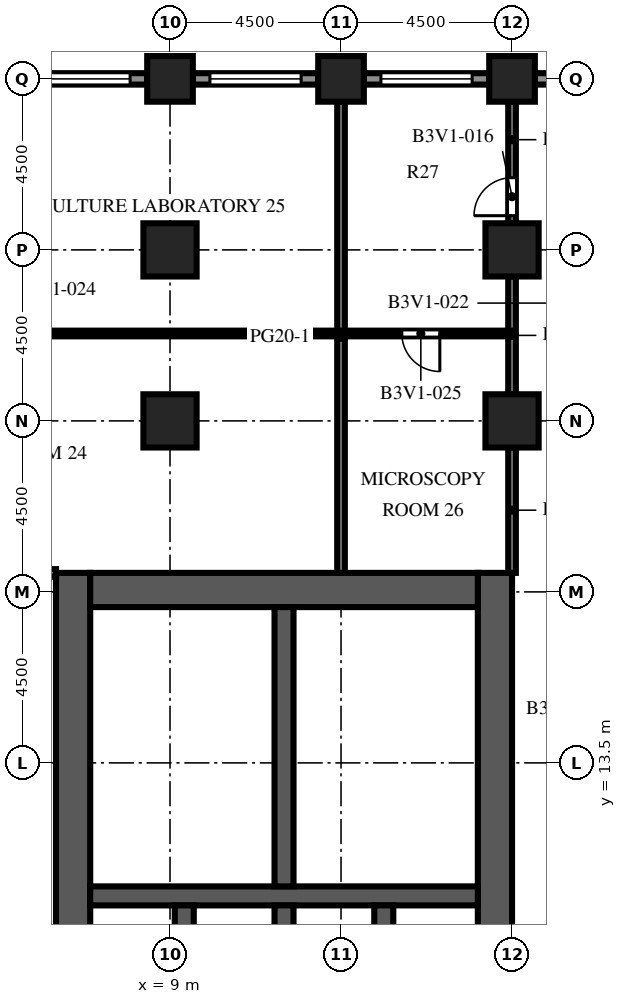
"""IFC4 building model, lengths in metres.
Left out: names, types, materials, properties, quantities, classifications, styles, units other than length and angle.
Written with IfcOpenShell. Run it as: python <this file> out.ifc"""

import sys

from ifc_helpers import new_model, si_unit, direction, frame, frame_2d, origin, origin_2d, place, context, subcontext, project, spatial, rectangle, extrude, element, fill, save


model = new_model("IFC4")
c1 = context("Model", 3, precision=1e-05, world=origin(), true_north=direction((0.0, 1.0)))
c2 = subcontext(c1, "Body", "Model", "MODEL_VIEW")
j1 = project(units=[si_unit("LENGTHUNIT", "METRE"), si_unit("PLANEANGLEUNIT", "RADIAN")], contexts=[c1])
p1 = place(None, origin())
s1 = spatial("IfcSite", under=j1, at=p1, CompositionType="ELEMENT")
p2 = place(p1, origin())
s2 = spatial("IfcBuilding", under=s1, at=p2, CompositionType="ELEMENT")
p3 = place(p2, frame((0.0, 0.0, 94.3)))
s3 = spatial("IfcBuildingStorey", under=s2, at=p3, CompositionType="ELEMENT", Elevation=94.3)
for number, where, z_axis, x_axis in (
    (1, (9.0, 31.5, 0.0), (0.0, 0.0, 1.0), (1.0, 0.0, 0.0)),
    (2, (13.5, 31.5, 0.0), (0.0, 0.0, 1.0), (1.0, 0.0, 0.0)),
    (3, (18.0, 31.5, 0.0), (0.0, 0.0, 1.0), (1.0, 0.0, 0.0)),
):
    element("IfcColumn", number, at=place(p3, frame(where, z_axis=z_axis, x_axis=x_axis)), inside=s3, PredefinedType="COLUMN", context=c2, shape_type="SweptSolid", body=[
        extrude(rectangle(XDim=1.2, YDim=1.2, at=origin_2d()), origin(), (0.0, 0.0, 1.0), 4.1),
    ])
for number, where, z_axis, x_axis in (
    (4, (9.0, 22.5, 0.0), (0.0, 0.0, 1.0), (1.0, 0.0, 0.0)),
    (5, (9.0, 27.0, 0.0), (0.0, 0.0, 1.0), (1.0, 0.0, 0.0)),
    (6, (18.0, 22.5, 0.0), (0.0, 0.0, 1.0), (1.0, 0.0, 0.0)),
    (7, (18.0, 27.0, 0.0), (0.0, 0.0, 1.0), (1.0, 0.0, 0.0)),
):
    element("IfcColumn", number, at=place(p3, frame(where, z_axis=z_axis, x_axis=x_axis)), inside=s3, PredefinedType="COLUMN", context=c2, shape_type="SweptSolid", body=[
        extrude(rectangle(XDim=1.4, YDim=1.4, at=origin_2d()), origin(), (0.0, 0.0, 1.0), 4.1),
    ])
p4 = place(p3, frame((6.45, -9.0, 0.0), z_axis=(0.0, 0.0, 1.0), x_axis=(0.0, 1.0, 0.0)))
e8 = element("IfcWall", 8, at=p4, inside=s3, PredefinedType="SHEAR", context=c2, shape_type="SweptSolid", body=[
    extrude(rectangle(XDim=27.5, YDim=0.9, at=frame_2d((13.75, 0.0))), origin(), (0.0, 0.0, 1.0), 4.1),
])
p5 = place(p4, frame((12.55, 0.0, 0.0)))
e9 = element("IfcOpeningElement", 9, at=p5, cuts=e8, PredefinedType="OPENING", context=c2, shape_type="SweptSolid", body=[
    extrude(rectangle(XDim=2.4, YDim=2.4, at=frame_2d((1.2, 1.2))), frame((0.0, 0.46, 0.0), z_axis=(0.0, -1.0, 0.0), x_axis=(1.0, 0.0, 0.0)), (0.0, 0.0, 1.0), 0.92),
])
p6 = place(p4, frame((3.975, 0.0, 0.0)))
e10 = element("IfcOpeningElement", 10, at=p6, cuts=e8, PredefinedType="OPENING", context=c2, shape_type="SweptSolid", body=[
    extrude(rectangle(XDim=1.2, YDim=2.1, at=frame_2d((0.6, 1.05))), frame((0.0, 0.46, 0.0), z_axis=(0.0, -1.0, 0.0), x_axis=(1.0, 0.0, 0.0)), (0.0, 0.0, 1.0), 0.92),
])
p7 = place(p4, frame((22.325, 0.0, 0.0)))
e11 = element("IfcOpeningElement", 11, at=p7, cuts=e8, PredefinedType="OPENING", context=c2, shape_type="SweptSolid", body=[
    extrude(rectangle(XDim=1.2, YDim=2.1, at=frame_2d((0.6, 1.05))), frame((0.0, 0.46, 0.0), z_axis=(0.0, -1.0, 0.0), x_axis=(1.0, 0.0, 0.0)), (0.0, 0.0, 1.0), 0.92),
])
p8 = place(p3, frame((17.55, -9.0, 0.0), z_axis=(0.0, 0.0, 1.0), x_axis=(0.0, 1.0, 0.0)))
e12 = element("IfcWall", 12, at=p8, inside=s3, PredefinedType="SHEAR", context=c2, shape_type="SweptSolid", body=[
    extrude(rectangle(XDim=27.5, YDim=0.9, at=frame_2d((13.75, 0.0))), origin(), (0.0, 0.0, 1.0), 4.1),
])
p9 = place(p8, frame((12.55, 0.0, 0.0)))
e13 = element("IfcOpeningElement", 13, at=p9, cuts=e12, PredefinedType="OPENING", context=c2, shape_type="SweptSolid", body=[
    extrude(rectangle(XDim=2.4, YDim=2.4, at=frame_2d((1.2, 1.2))), frame((0.0, 0.46, 0.0), z_axis=(0.0, -1.0, 0.0), x_axis=(1.0, 0.0, 0.0)), (0.0, 0.0, 1.0), 0.92),
])
p10 = place(p8, frame((6.825, 0.0, 0.0)))
e14 = element("IfcOpeningElement", 14, at=p10, cuts=e12, PredefinedType="OPENING", context=c2, shape_type="SweptSolid", body=[
    extrude(rectangle(XDim=1.2, YDim=2.1, at=frame_2d((0.6, 1.05))), frame((0.0, 0.46, 0.0), z_axis=(0.0, -1.0, 0.0), x_axis=(1.0, 0.0, 0.0)), (0.0, 0.0, 1.0), 0.92),
])
p11 = place(p8, frame((19.475, 0.0, 0.0)))
e15 = element("IfcOpeningElement", 15, at=p11, cuts=e12, PredefinedType="OPENING", context=c2, shape_type="SweptSolid", body=[
    extrude(rectangle(XDim=1.2, YDim=2.1, at=frame_2d((0.6, 1.05))), frame((0.0, 0.46, 0.0), z_axis=(0.0, -1.0, 0.0), x_axis=(1.0, 0.0, 0.0)), (0.0, 0.0, 1.0), 0.92),
])
p12 = place(p3, frame((6.9, 18.05, 0.0), z_axis=(0.0, 0.0, 1.0), x_axis=(1.0, 0.0, 0.0)))
e16 = element("IfcWall", 16, at=p12, inside=s3, PredefinedType="SHEAR", context=c2, shape_type="SweptSolid", body=[
    extrude(rectangle(XDim=10.2, YDim=0.9, at=frame_2d((5.1, 0.0))), origin(), (0.0, 0.0, 1.0), 4.1),
])
p13 = place(p3, frame((6.9, 10.0, 0.0), z_axis=(0.0, 0.0, 1.0), x_axis=(1.0, 0.0, 0.0)))
e17 = element("IfcWall", 17, at=p13, inside=s3, PredefinedType="SHEAR", context=c2, shape_type="SweptSolid", body=[
    extrude(rectangle(XDim=10.2, YDim=0.5, at=frame_2d((5.1, 0.0))), origin(), (0.0, 0.0, 1.0), 4.1),
])
for number, where, z_axis, x_axis in (
    (18, (9.375, 6.95, 0.0), (0.0, 0.0, 1.0), (0.0, 1.0, 0.0)),
    (19, (12.0, 6.95, 0.0), (0.0, 0.0, 1.0), (0.0, 1.0, 0.0)),
    (20, (14.625, 6.95, 0.0), (0.0, 0.0, 1.0), (0.0, 1.0, 0.0)),
):
    element("IfcWall", number, at=place(p3, frame(where, z_axis=z_axis, x_axis=x_axis)), inside=s3, PredefinedType="SHEAR", context=c2, shape_type="SweptSolid", body=[
        extrude(rectangle(XDim=2.8, YDim=0.5, at=frame_2d((1.4, 0.0))), origin(), (0.0, 0.0, 1.0), 4.1),
    ])
p14 = place(p3, frame((12.0, 10.25, 0.0), z_axis=(0.0, 0.0, 1.0), x_axis=(0.0, 1.0, 0.0)))
e21 = element("IfcWall", 21, at=p14, inside=s3, PredefinedType="SHEAR", context=c2, shape_type="SweptSolid", body=[
    extrude(rectangle(XDim=7.35, YDim=0.5, at=frame_2d((3.675, 0.0))), origin(), (0.0, 0.0, 1.0), 4.1),
])
p15 = place(p3, frame((18.6, 31.5, 0.0), z_axis=(0.0, 0.0, 1.0), x_axis=(1.0, 0.0, 0.0)))
e22 = element("IfcWall", 22, at=p15, inside=s3, PredefinedType="SOLIDWALL", context=c2, shape_type="SweptSolid", body=[
    extrude(rectangle(XDim=3.3, YDim=0.3, at=frame_2d((1.65, 0.0))), origin(), (0.0, 0.0, 1.0), 2.75),
])
p16 = place(p15, frame((1.15, 0.0, 0.0)))
e23 = element("IfcOpeningElement", 23, at=p16, cuts=e22, PredefinedType="OPENING", context=c2, shape_type="SweptSolid", body=[
    extrude(rectangle(XDim=1.0, YDim=2.2, at=frame_2d((0.5, 1.1))), frame((0.0, 0.16, 0.0), z_axis=(0.0, -1.0, 0.0), x_axis=(1.0, 0.0, 0.0)), (0.0, 0.0, 1.0), 0.32),
])
p17 = place(p3, frame((14.1, 31.5, 0.0), z_axis=(0.0, 0.0, 1.0), x_axis=(1.0, 0.0, 0.0)))
e24 = element("IfcWall", 24, at=p17, inside=s3, PredefinedType="SOLIDWALL", context=c2, shape_type="SweptSolid", body=[
    extrude(rectangle(XDim=3.3, YDim=0.3, at=frame_2d((1.65, 0.0))), origin(), (0.0, 0.0, 1.0), 2.75),
])
p18 = place(p17, frame((0.45, 0.0, 0.8)))
e25 = element("IfcOpeningElement", 25, at=p18, cuts=e24, PredefinedType="OPENING", context=c2, shape_type="SweptSolid", body=[
    extrude(rectangle(XDim=2.4, YDim=1.7, at=frame_2d((1.2, 0.85))), frame((0.0, 0.16, 0.0), z_axis=(0.0, -1.0, 0.0), x_axis=(1.0, 0.0, 0.0)), (0.0, 0.0, 1.0), 0.32),
])
p19 = place(p3, frame((9.6, 31.5, 0.0), z_axis=(0.0, 0.0, 1.0), x_axis=(1.0, 0.0, 0.0)))
e26 = element("IfcWall", 26, at=p19, inside=s3, PredefinedType="SOLIDWALL", context=c2, shape_type="SweptSolid", body=[
    extrude(rectangle(XDim=3.3, YDim=0.3, at=frame_2d((1.65, 0.0))), origin(), (0.0, 0.0, 1.0), 2.75),
])
p20 = place(p19, frame((0.45, 0.0, 0.8)))
e27 = element("IfcOpeningElement", 27, at=p20, cuts=e26, PredefinedType="OPENING", context=c2, shape_type="SweptSolid", body=[
    extrude(rectangle(XDim=2.4, YDim=1.7, at=frame_2d((1.2, 0.85))), frame((0.0, 0.16, 0.0), z_axis=(0.0, -1.0, 0.0), x_axis=(1.0, 0.0, 0.0)), (0.0, 0.0, 1.0), 0.32),
])
p21 = place(p3, frame((5.1, 31.5, 0.0), z_axis=(0.0, 0.0, 1.0), x_axis=(1.0, 0.0, 0.0)))
e28 = element("IfcWall", 28, at=p21, inside=s3, PredefinedType="SOLIDWALL", context=c2, shape_type="SweptSolid", body=[
    extrude(rectangle(XDim=3.3, YDim=0.3, at=frame_2d((1.65, 0.0))), origin(), (0.0, 0.0, 1.0), 2.75),
])
p22 = place(p21, frame((0.45, 0.0, 0.8)))
e29 = element("IfcOpeningElement", 29, at=p22, cuts=e28, PredefinedType="OPENING", context=c2, shape_type="SweptSolid", body=[
    extrude(rectangle(XDim=2.4, YDim=1.7, at=frame_2d((1.2, 0.85))), frame((0.0, 0.16, 0.0), z_axis=(0.0, -1.0, 0.0), x_axis=(1.0, 0.0, 0.0)), (0.0, 0.0, 1.0), 0.32),
])
p23 = place(p3, frame((8.3, 10.25, 0.0), z_axis=(0.0, 0.0, 1.0), x_axis=(0.0, 1.0, 0.0)))
e30 = element("IfcWall", 30, at=p23, inside=s3, PredefinedType="PARTITIONING", context=c2, shape_type="SweptSolid", body=[
    extrude(rectangle(XDim=2.205, YDim=0.1, at=frame_2d((1.103, 0.0))), origin(), (0.0, 0.0, 1.0), 3.65),
])
p24 = place(p23, frame((0.603, 0.0, 0.0)))
e31 = element("IfcOpeningElement", 31, at=p24, cuts=e30, PredefinedType="OPENING", context=c2, shape_type="SweptSolid", body=[
    extrude(rectangle(XDim=1.0, YDim=2.1, at=frame_2d((0.5, 1.05))), frame((0.0, 0.06, 0.0), z_axis=(0.0, -1.0, 0.0), x_axis=(1.0, 0.0, 0.0)), (0.0, 0.0, 1.0), 0.12),
])
p25 = place(p3, frame((8.3, 12.455, 0.0), z_axis=(0.0, 0.0, 1.0), x_axis=(0.0, 1.0, 0.0)))
e32 = element("IfcWall", 32, at=p25, inside=s3, PredefinedType="PARTITIONING", context=c2, shape_type="SweptSolid", body=[
    extrude(rectangle(XDim=2.352, YDim=0.1, at=frame_2d((1.176, 0.0))), origin(), (0.0, 0.0, 1.0), 3.65),
])
p26 = place(p25, frame((0.676, 0.0, 0.0)))
e33 = element("IfcOpeningElement", 33, at=p26, cuts=e32, PredefinedType="OPENING", context=c2, shape_type="SweptSolid", body=[
    extrude(rectangle(XDim=1.0, YDim=2.1, at=frame_2d((0.5, 1.05))), frame((0.0, 0.06, 0.0), z_axis=(0.0, -1.0, 0.0), x_axis=(1.0, 0.0, 0.0)), (0.0, 0.0, 1.0), 0.12),
])
p27 = place(p3, frame((8.3, 14.807, 0.0), z_axis=(0.0, 0.0, 1.0), x_axis=(0.0, 1.0, 0.0)))
e34 = element("IfcWall", 34, at=p27, inside=s3, PredefinedType="PARTITIONING", context=c2, shape_type="SweptSolid", body=[
    extrude(rectangle(XDim=2.793, YDim=0.1, at=frame_2d((1.396, 0.0))), origin(), (0.0, 0.0, 1.0), 3.65),
])
p28 = place(p27, frame((0.896, 0.0, 0.0)))
e35 = element("IfcOpeningElement", 35, at=p28, cuts=e34, PredefinedType="OPENING", context=c2, shape_type="SweptSolid", body=[
    extrude(rectangle(XDim=1.0, YDim=2.1, at=frame_2d((0.5, 1.05))), frame((0.0, 0.06, 0.0), z_axis=(0.0, -1.0, 0.0), x_axis=(1.0, 0.0, 0.0)), (0.0, 0.0, 1.0), 0.12),
])
for number, where, z_axis, x_axis in (
    (36, (8.3, 12.455, 0.0), (0.0, 0.0, 1.0), (1.0, 0.0, 0.0)),
    (37, (8.3, 14.807, 0.0), (0.0, 0.0, 1.0), (1.0, 0.0, 0.0)),
):
    element("IfcWall", number, at=place(p3, frame(where, z_axis=z_axis, x_axis=x_axis)), inside=s3, PredefinedType="PARTITIONING", context=c2, shape_type="SweptSolid", body=[
        extrude(rectangle(XDim=3.45, YDim=0.1, at=frame_2d((1.725, 0.0))), origin(), (0.0, 0.0, 1.0), 3.65),
    ])
p29 = place(p3, frame((13.5, 18.5, 0.0), z_axis=(0.0, 0.0, 1.0), x_axis=(0.0, 1.0, 0.0)))
e38 = element("IfcWall", 38, at=p29, inside=s3, PredefinedType="PARTITIONING", context=c2, shape_type="SweptSolid", body=[
    extrude(rectangle(XDim=12.4, YDim=0.2, at=frame_2d((6.2, 0.0))), origin(), (0.0, 0.0, 1.0), 3.65),
])
p30 = place(p3, frame((18.0, 18.5, 0.0), z_axis=(0.0, 0.0, 1.0), x_axis=(0.0, 1.0, 0.0)))
e39 = element("IfcWall", 39, at=p30, inside=s3, PredefinedType="PARTITIONING", context=c2, shape_type="SweptSolid", body=[
    extrude(rectangle(XDim=3.3, YDim=0.2, at=frame_2d((1.65, 0.0))), origin(), (0.0, 0.0, 1.0), 3.65),
])
p31 = place(p3, frame((18.0, 23.2, 0.0), z_axis=(0.0, 0.0, 1.0), x_axis=(0.0, 1.0, 0.0)))
e40 = element("IfcWall", 40, at=p31, inside=s3, PredefinedType="PARTITIONING", context=c2, shape_type="SweptSolid", body=[
    extrude(rectangle(XDim=3.1, YDim=0.2, at=frame_2d((1.55, 0.0))), origin(), (0.0, 0.0, 1.0), 3.65),
])
p32 = place(p3, frame((18.0, 27.7, 0.0), z_axis=(0.0, 0.0, 1.0), x_axis=(0.0, 1.0, 0.0)))
e41 = element("IfcWall", 41, at=p32, inside=s3, PredefinedType="PARTITIONING", context=c2, shape_type="SweptSolid", body=[
    extrude(rectangle(XDim=3.2, YDim=0.2, at=frame_2d((1.6, 0.0))), origin(), (0.0, 0.0, 1.0), 3.65),
])
p33 = place(p32, frame((0.2, 0.0, 0.0)))
e42 = element("IfcOpeningElement", 42, at=p33, cuts=e41, PredefinedType="OPENING", context=c2, shape_type="SweptSolid", body=[
    extrude(rectangle(XDim=1.0, YDim=2.1, at=frame_2d((0.5, 1.05))), frame((0.0, 0.11, 0.0), z_axis=(0.0, -1.0, 0.0), x_axis=(1.0, 0.0, 0.0)), (0.0, 0.0, 1.0), 0.22),
])
p34 = place(p3, frame((1.5, 18.5, 0.0), z_axis=(0.0, 0.0, 1.0), x_axis=(1.0, 0.0, 0.0)))
e43 = element("IfcWall", 43, at=p34, inside=s3, PredefinedType="PARTITIONING", context=c2, shape_type="SweptSolid", body=[
    extrude(rectangle(XDim=4.5, YDim=0.2, at=frame_2d((2.25, 0.0))), origin(), (0.0, 0.0, 1.0), 3.65),
])
p35 = place(p3, frame((18.0, 24.8, 0.0), z_axis=(0.0, 0.0, 1.0), x_axis=(-1.0, 0.0, 0.0)))
e44 = element("IfcWall", 44, at=p35, inside=s3, PredefinedType="PARTITIONING", context=c2, shape_type="SweptSolid", body=[
    extrude(rectangle(XDim=28.5, YDim=0.15, at=frame_2d((14.25, 0.0))), origin(), (0.0, 0.0, 1.0), 3.65),
])
p36 = place(p35, frame((23.65, 0.0, 0.0)))
e45 = element("IfcOpeningElement", 45, at=p36, cuts=e44, PredefinedType="OPENING", context=c2, shape_type="SweptSolid", body=[
    extrude(rectangle(XDim=1.0, YDim=2.1, at=frame_2d((0.5, 1.05))), frame((0.0, 0.085, 0.0), z_axis=(0.0, -1.0, 0.0), x_axis=(1.0, 0.0, 0.0)), (0.0, 0.0, 1.0), 0.17),
])
p37 = place(p35, frame((12.65, 0.0, 0.0)))
e46 = element("IfcOpeningElement", 46, at=p37, cuts=e44, PredefinedType="OPENING", context=c2, shape_type="SweptSolid", body=[
    extrude(rectangle(XDim=1.0, YDim=2.1, at=frame_2d((0.5, 1.05))), frame((0.0, 0.085, 0.0), z_axis=(0.0, -1.0, 0.0), x_axis=(1.0, 0.0, 0.0)), (0.0, 0.0, 1.0), 0.17),
])
p38 = place(p35, frame((1.9, 0.0, 0.0)))
e47 = element("IfcOpeningElement", 47, at=p38, cuts=e44, PredefinedType="OPENING", context=c2, shape_type="SweptSolid", body=[
    extrude(rectangle(XDim=1.0, YDim=2.1, at=frame_2d((0.5, 1.05))), frame((0.0, 0.085, 0.0), z_axis=(0.0, -1.0, 0.0), x_axis=(1.0, 0.0, 0.0)), (0.0, 0.0, 1.0), 0.17),
])
p39 = place(p18, origin())
e48 = element("IfcWindow", 48, at=p39, inside=s3, PartitioningType="SINGLE_PANEL", PredefinedType="WINDOW", context=c2, shape_type="SweptSolid", body=[
    extrude(rectangle(XDim=2.4, YDim=1.7, at=frame_2d((1.2, 0.85))), frame((0.0, 0.03, 0.0), z_axis=(0.0, -1.0, 0.0), x_axis=(1.0, 0.0, 0.0)), (0.0, 0.0, 1.0), 0.06),
])
fill(e25, e48)
p40 = place(p20, origin())
e49 = element("IfcWindow", 49, at=p40, inside=s3, PartitioningType="SINGLE_PANEL", PredefinedType="WINDOW", context=c2, shape_type="SweptSolid", body=[
    extrude(rectangle(XDim=2.4, YDim=1.7, at=frame_2d((1.2, 0.85))), frame((0.0, 0.03, 0.0), z_axis=(0.0, -1.0, 0.0), x_axis=(1.0, 0.0, 0.0)), (0.0, 0.0, 1.0), 0.06),
])
fill(e27, e49)
p41 = place(p22, origin())
e50 = element("IfcWindow", 50, at=p41, inside=s3, PartitioningType="SINGLE_PANEL", PredefinedType="WINDOW", context=c2, shape_type="SweptSolid", body=[
    extrude(rectangle(XDim=2.4, YDim=1.7, at=frame_2d((1.2, 0.85))), frame((0.0, 0.03, 0.0), z_axis=(0.0, -1.0, 0.0), x_axis=(1.0, 0.0, 0.0)), (0.0, 0.0, 1.0), 0.06),
])
fill(e29, e50)
p42 = place(p11, frame((1.2, 0.0, 0.0), z_axis=(0.0, 0.0, 1.0), x_axis=(-1.0, 0.0, 0.0)))
e51 = element("IfcDoor", 51, at=p42, inside=s3, OperationType="SINGLE_SWING_LEFT", PredefinedType="DOOR", context=c2, shape_type="SweptSolid", body=[
    extrude(rectangle(XDim=1.2, YDim=2.1, at=frame_2d((0.6, 1.05))), frame((0.0, 0.025, 0.0), z_axis=(0.0, -1.0, 0.0), x_axis=(1.0, 0.0, 0.0)), (0.0, 0.0, 1.0), 0.05),
])
fill(e15, e51)
p43 = place(p7, origin())
e52 = element("IfcDoor", 52, at=p43, inside=s3, OperationType="SINGLE_SWING_RIGHT", PredefinedType="DOOR", context=c2, shape_type="SweptSolid", body=[
    extrude(rectangle(XDim=1.2, YDim=2.1, at=frame_2d((0.6, 1.05))), frame((0.0, -0.375, 0.0), z_axis=(0.0, -1.0, 0.0), x_axis=(1.0, 0.0, 0.0)), (0.0, 0.0, 1.0), 0.05),
])
fill(e11, e52)
p44 = place(p24, origin())
e53 = element("IfcDoor", 53, at=p44, inside=s3, OperationType="SINGLE_SWING_LEFT", PredefinedType="DOOR", context=c2, shape_type="SweptSolid", body=[
    extrude(rectangle(XDim=1.0, YDim=2.1, at=frame_2d((0.5, 1.05))), frame((0.0, 0.025, 0.0), z_axis=(0.0, -1.0, 0.0), x_axis=(1.0, 0.0, 0.0)), (0.0, 0.0, 1.0), 0.05),
])
fill(e31, e53)
p45 = place(p26, origin())
e54 = element("IfcDoor", 54, at=p45, inside=s3, OperationType="SINGLE_SWING_RIGHT", PredefinedType="DOOR", context=c2, shape_type="SweptSolid", body=[
    extrude(rectangle(XDim=1.0, YDim=2.1, at=frame_2d((0.5, 1.05))), frame((0.0, 0.025, 0.0), z_axis=(0.0, -1.0, 0.0), x_axis=(1.0, 0.0, 0.0)), (0.0, 0.0, 1.0), 0.05),
])
fill(e33, e54)
p46 = place(p28, origin())
e55 = element("IfcDoor", 55, at=p46, inside=s3, OperationType="SINGLE_SWING_LEFT", PredefinedType="DOOR", context=c2, shape_type="SweptSolid", body=[
    extrude(rectangle(XDim=1.0, YDim=2.1, at=frame_2d((0.5, 1.05))), frame((0.0, 0.025, 0.0), z_axis=(0.0, -1.0, 0.0), x_axis=(1.0, 0.0, 0.0)), (0.0, 0.0, 1.0), 0.05),
])
fill(e35, e55)
p47 = place(p33, origin())
e56 = element("IfcDoor", 56, at=p47, inside=s3, OperationType="SINGLE_SWING_LEFT", PredefinedType="DOOR", context=c2, shape_type="SweptSolid", body=[
    extrude(rectangle(XDim=1.0, YDim=2.1, at=frame_2d((0.5, 1.05))), frame((0.0, 0.025, 0.0), z_axis=(0.0, -1.0, 0.0), x_axis=(1.0, 0.0, 0.0)), (0.0, 0.0, 1.0), 0.05),
])
fill(e42, e56)
p48 = place(p38, origin())
e57 = element("IfcDoor", 57, at=p48, inside=s3, OperationType="SINGLE_SWING_LEFT", PredefinedType="DOOR", context=c2, shape_type="SweptSolid", body=[
    extrude(rectangle(XDim=1.0, YDim=2.1, at=frame_2d((0.5, 1.05))), frame((0.0, 0.025, 0.0), z_axis=(0.0, -1.0, 0.0), x_axis=(1.0, 0.0, 0.0)), (0.0, 0.0, 1.0), 0.05),
])
fill(e47, e57)
save(model, sys.argv[1])
